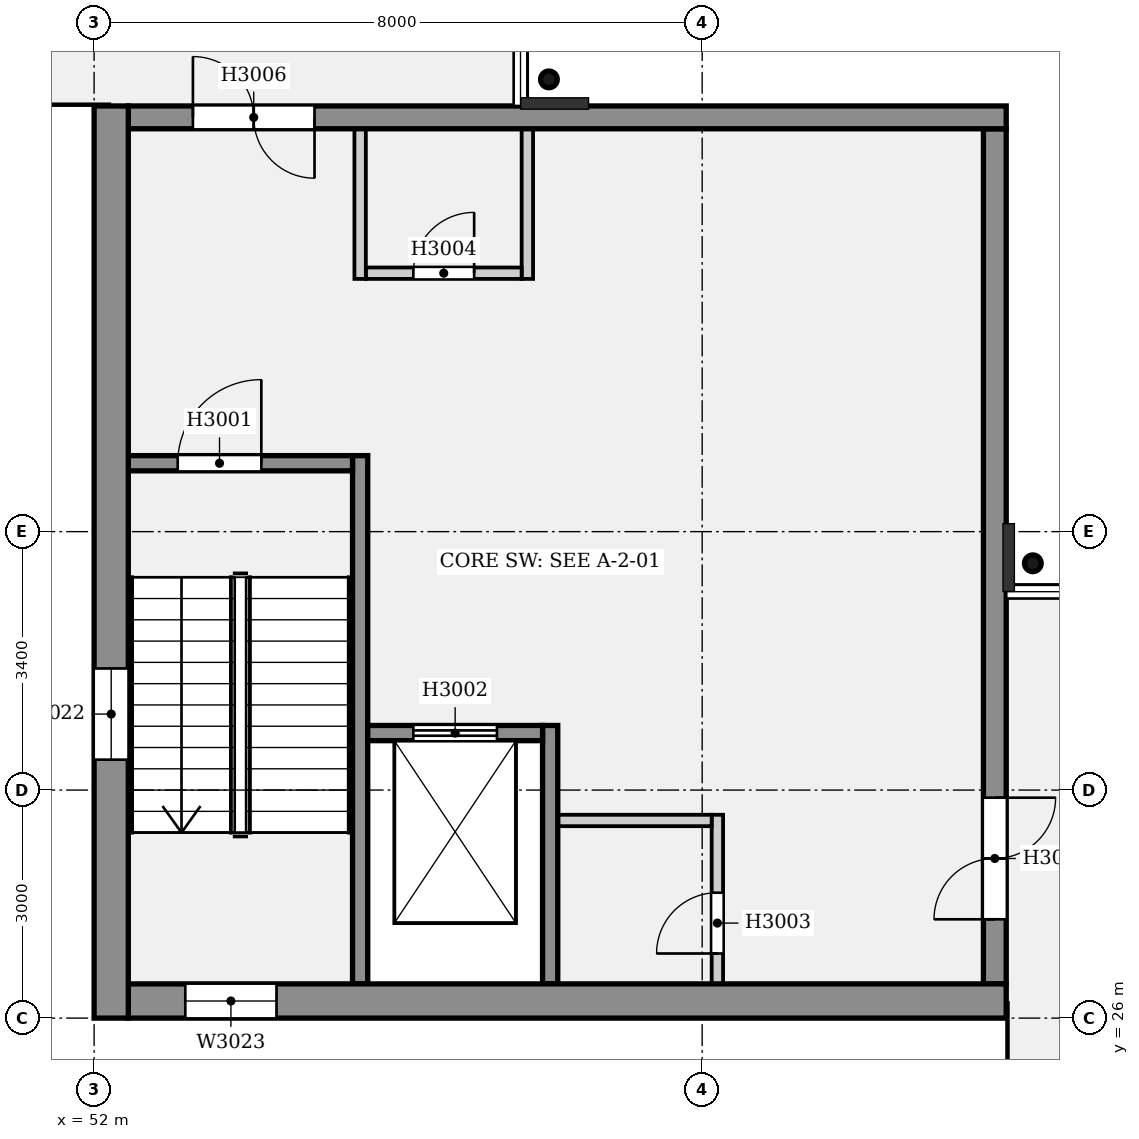
"""IFC4 building model, lengths in metres.
Left out: names, types, materials, properties, quantities, classifications, styles, units other than length and angle.
Written with IfcOpenShell. Run it as: python <this file> out.ifc"""

import sys

from ifc_helpers import new_model, si_unit, direction, frame, frame_2d, origin, origin_2d, place, context, subcontext, project, spatial, rectangle, hollow_circle, extrude, element, fill, save


model = new_model("IFC4")
c1 = context("Model", 3, precision=1e-05, world=origin(), true_north=direction((0.0, 1.0)))
c2 = subcontext(c1, "Body", "Model", "MODEL_VIEW")
j1 = project(units=[si_unit("LENGTHUNIT", "METRE"), si_unit("PLANEANGLEUNIT", "RADIAN")], contexts=[c1])
p1 = place(None, origin())
s1 = spatial("IfcSite", under=j1, at=p1, CompositionType="ELEMENT")
p2 = place(p1, origin())
s2 = spatial("IfcBuilding", under=s1, at=p2, CompositionType="ELEMENT")
p3 = place(p2, frame((0.0, 0.0, 13.8)))
s3 = spatial("IfcBuildingStorey", under=s2, at=p3, CompositionType="ELEMENT", Elevation=13.8)
p4 = place(p3, frame((52.225, 26.0, 0.0), z_axis=(0.0, 0.0, 1.0), x_axis=(0.0, 1.0, 0.0)))
e1 = element("IfcWall", 1, at=p4, inside=s3, PredefinedType="ELEMENTEDWALL", context=c2, shape_type="SweptSolid", body=[
    extrude(rectangle(XDim=12.0, YDim=0.45, at=frame_2d((6.0, 0.0))), origin(), (0.0, 0.0, 1.0), 4.4),
])
p5 = place(p4, frame((3.4, 0.0, 0.6)))
e2 = element("IfcOpeningElement", 2, at=p5, cuts=e1, PredefinedType="OPENING", context=c2, shape_type="SweptSolid", body=[
    extrude(rectangle(XDim=1.2, YDim=3.0, at=frame_2d((0.6, 1.5))), frame((0.0, 0.235, 0.0), z_axis=(0.0, -1.0, 0.0), x_axis=(1.0, 0.0, 0.0)), (0.0, 0.0, 1.0), 0.47),
])
p6 = place(p3, frame((52.45, 26.225, 0.0), z_axis=(0.0, 0.0, 1.0), x_axis=(1.0, 0.0, 0.0)))
e3 = element("IfcWall", 3, at=p6, inside=s3, PredefinedType="ELEMENTEDWALL", context=c2, shape_type="SweptSolid", body=[
    extrude(rectangle(XDim=11.55, YDim=0.45, at=frame_2d((5.775, 0.0))), origin(), (0.0, 0.0, 1.0), 4.4),
])
p7 = place(p6, frame((0.75, 0.0, 0.6)))
e4 = element("IfcOpeningElement", 4, at=p7, cuts=e3, PredefinedType="OPENING", context=c2, shape_type="SweptSolid", body=[
    extrude(rectangle(XDim=1.2, YDim=3.0, at=frame_2d((0.6, 1.5))), frame((0.0, 0.235, 0.0), z_axis=(0.0, -1.0, 0.0), x_axis=(1.0, 0.0, 0.0)), (0.0, 0.0, 1.0), 0.47),
])
p8 = place(p3, frame((63.85, 26.45, 0.0), z_axis=(0.0, 0.0, 1.0), x_axis=(0.0, 1.0, 0.0)))
e5 = element("IfcWall", 5, at=p8, inside=s3, PredefinedType="SOLIDWALL", context=c2, shape_type="SweptSolid", body=[
    extrude(rectangle(XDim=11.25, YDim=0.3, at=frame_2d((5.625, 0.0))), origin(), (0.0, 0.0, 1.0), 4.4),
])
p9 = place(p8, frame((0.85, 0.0, 0.0)))
e6 = element("IfcOpeningElement", 6, at=p9, cuts=e5, PredefinedType="OPENING", context=c2, shape_type="SweptSolid", body=[
    extrude(rectangle(XDim=1.6, YDim=2.1, at=frame_2d((0.8, 1.05))), frame((0.0, 0.16, 0.0), z_axis=(0.0, -1.0, 0.0), x_axis=(1.0, 0.0, 0.0)), (0.0, 0.0, 1.0), 0.32),
])
p10 = place(p3, frame((52.45, 37.85, 0.0), z_axis=(0.0, 0.0, 1.0), x_axis=(1.0, 0.0, 0.0)))
e7 = element("IfcWall", 7, at=p10, inside=s3, PredefinedType="SOLIDWALL", context=c2, shape_type="SweptSolid", body=[
    extrude(rectangle(XDim=11.55, YDim=0.3, at=frame_2d((5.775, 0.0))), origin(), (0.0, 0.0, 1.0), 4.4),
])
p11 = place(p10, frame((0.85, 0.0, 0.0)))
e8 = element("IfcOpeningElement", 8, at=p11, cuts=e7, PredefinedType="OPENING", context=c2, shape_type="SweptSolid", body=[
    extrude(rectangle(XDim=1.6, YDim=2.1, at=frame_2d((0.8, 1.05))), frame((0.0, 0.16, 0.0), z_axis=(0.0, -1.0, 0.0), x_axis=(1.0, 0.0, 0.0)), (0.0, 0.0, 1.0), 0.32),
])
for number, where, z_axis, x_axis in (
    (9, (64.35, 31.984, -0.128), (0.0, 0.199, 0.98), (-1.0, 0.0, 0.0)),
    (10, (57.984, 38.35, -0.128), (0.199, 0.0, 0.98), (0.0, 1.0, 0.0)),
):
    element("IfcColumn", number, at=place(p3, frame(where, z_axis=z_axis, x_axis=x_axis)), inside=s3, PredefinedType="COLUMN", context=c2, shape_type="SweptSolid", body=[
        extrude(hollow_circle(Radius=0.11, WallThickness=0.013, at=origin_2d()), origin(), (0.0, 0.0, 1.0), 4.621),
    ])
p12 = place(p3, frame((55.5, 26.45, 0.0), z_axis=(0.0, 0.0, 1.0), x_axis=(0.0, 1.0, 0.0)))
e11 = element("IfcWall", 11, at=p12, inside=s3, PredefinedType="SOLIDWALL", context=c2, shape_type="SweptSolid", body=[
    extrude(rectangle(XDim=6.95, YDim=0.2, at=frame_2d((3.475, 0.0))), origin(), (0.0, 0.0, 1.0), 4.4),
])
p13 = place(p3, frame((52.45, 33.3, 0.0), z_axis=(0.0, 0.0, 1.0), x_axis=(1.0, 0.0, 0.0)))
e12 = element("IfcWall", 12, at=p13, inside=s3, PredefinedType="SOLIDWALL", context=c2, shape_type="SweptSolid", body=[
    extrude(rectangle(XDim=2.95, YDim=0.2, at=frame_2d((1.475, 0.0))), origin(), (0.0, 0.0, 1.0), 4.4),
])
p14 = place(p13, frame((0.65, 0.0, 0.0)))
e13 = element("IfcOpeningElement", 13, at=p14, cuts=e12, PredefinedType="OPENING", context=c2, shape_type="SweptSolid", body=[
    extrude(rectangle(XDim=1.1, YDim=2.1, at=frame_2d((0.55, 1.05))), frame((0.0, 0.11, 0.0), z_axis=(0.0, -1.0, 0.0), x_axis=(1.0, 0.0, 0.0)), (0.0, 0.0, 1.0), 0.22),
])
p15 = place(p3, frame((58.0, 26.45, 0.0), z_axis=(0.0, 0.0, 1.0), x_axis=(0.0, 1.0, 0.0)))
e14 = element("IfcWall", 14, at=p15, inside=s3, PredefinedType="SOLIDWALL", context=c2, shape_type="SweptSolid", body=[
    extrude(rectangle(XDim=3.4, YDim=0.2, at=frame_2d((1.7, 0.0))), origin(), (0.0, 0.0, 1.0), 4.4),
])
p16 = place(p3, frame((55.6, 29.75, 0.0), z_axis=(0.0, 0.0, 1.0), x_axis=(1.0, 0.0, 0.0)))
e15 = element("IfcWall", 15, at=p16, inside=s3, PredefinedType="SOLIDWALL", context=c2, shape_type="SweptSolid", body=[
    extrude(rectangle(XDim=2.3, YDim=0.2, at=frame_2d((1.15, 0.0))), origin(), (0.0, 0.0, 1.0), 4.4),
])
p17 = place(p16, frame((0.6, 0.0, 0.0)))
e16 = element("IfcOpeningElement", 16, at=p17, cuts=e15, PredefinedType="OPENING", context=c2, shape_type="SweptSolid", body=[
    extrude(rectangle(XDim=1.1, YDim=2.1, at=frame_2d((0.55, 1.05))), frame((0.0, 0.11, 0.0), z_axis=(0.0, -1.0, 0.0), x_axis=(1.0, 0.0, 0.0)), (0.0, 0.0, 1.0), 0.22),
])
p18 = place(p3, frame((58.1, 28.6, 0.0), z_axis=(0.0, 0.0, 1.0), x_axis=(1.0, 0.0, 0.0)))
e17 = element("IfcWall", 17, at=p18, inside=s3, PredefinedType="PARTITIONING", context=c2, shape_type="SweptSolid", body=[
    extrude(rectangle(XDim=2.025, YDim=0.15, at=frame_2d((1.012, 0.0))), origin(), (0.0, 0.0, 1.0), 4.15),
])
p19 = place(p3, frame((60.2, 26.45, 0.0), z_axis=(0.0, 0.0, 1.0), x_axis=(0.0, 1.0, 0.0)))
e18 = element("IfcWall", 18, at=p19, inside=s3, PredefinedType="PARTITIONING", context=c2, shape_type="SweptSolid", body=[
    extrude(rectangle(XDim=2.225, YDim=0.15, at=frame_2d((1.113, 0.0))), origin(), (0.0, 0.0, 1.0), 4.15),
])
p20 = place(p19, frame((0.4, 0.0, 0.0)))
e19 = element("IfcOpeningElement", 19, at=p20, cuts=e18, PredefinedType="OPENING", context=c2, shape_type="SweptSolid", body=[
    extrude(rectangle(XDim=0.8, YDim=2.1, at=frame_2d((0.4, 1.05))), frame((0.0, 0.085, 0.0), z_axis=(0.0, -1.0, 0.0), x_axis=(1.0, 0.0, 0.0)), (0.0, 0.0, 1.0), 0.17),
])
p21 = place(p3, frame((55.575, 35.8, 0.0), z_axis=(0.0, 0.0, 1.0), x_axis=(1.0, 0.0, 0.0)))
e20 = element("IfcWall", 20, at=p21, inside=s3, PredefinedType="PARTITIONING", context=c2, shape_type="SweptSolid", body=[
    extrude(rectangle(XDim=2.05, YDim=0.15, at=frame_2d((1.025, 0.0))), origin(), (0.0, 0.0, 1.0), 4.15),
])
p22 = place(p21, frame((0.625, 0.0, 0.0)))
e21 = element("IfcOpeningElement", 21, at=p22, cuts=e20, PredefinedType="OPENING", context=c2, shape_type="SweptSolid", body=[
    extrude(rectangle(XDim=0.8, YDim=2.1, at=frame_2d((0.4, 1.05))), frame((0.0, 0.085, 0.0), z_axis=(0.0, -1.0, 0.0), x_axis=(1.0, 0.0, 0.0)), (0.0, 0.0, 1.0), 0.17),
])
for number, where, z_axis, x_axis in (
    (22, (55.5, 35.725, 0.0), (0.0, 0.0, 1.0), (0.0, 1.0, 0.0)),
    (23, (57.7, 35.725, 0.0), (0.0, 0.0, 1.0), (0.0, 1.0, 0.0)),
):
    element("IfcWall", number, at=place(p3, frame(where, z_axis=z_axis, x_axis=x_axis)), inside=s3, PredefinedType="PARTITIONING", context=c2, shape_type="SweptSolid", body=[
        extrude(rectangle(XDim=1.975, YDim=0.15, at=frame_2d((0.987, 0.0))), origin(), (0.0, 0.0, 1.0), 4.15),
    ])
p23 = place(p14, origin())
e24 = element("IfcDoor", 24, at=p23, inside=s3, OperationType="SINGLE_SWING_RIGHT", PredefinedType="DOOR", context=c2, shape_type="SweptSolid", body=[
    extrude(rectangle(XDim=1.1, YDim=2.1, at=frame_2d((0.55, 1.05))), frame((0.0, 0.025, 0.0), z_axis=(0.0, -1.0, 0.0), x_axis=(1.0, 0.0, 0.0)), (0.0, 0.0, 1.0), 0.05),
])
fill(e13, e24)
p24 = place(p17, origin())
e25 = element("IfcDoor", 25, at=p24, inside=s3, OperationType="DOUBLE_DOOR_SLIDING", PredefinedType="DOOR", context=c2, shape_type="SweptSolid", body=[
    extrude(rectangle(XDim=1.1, YDim=2.1, at=frame_2d((0.55, 1.05))), frame((0.0, 0.025, 0.0), z_axis=(0.0, -1.0, 0.0), x_axis=(1.0, 0.0, 0.0)), (0.0, 0.0, 1.0), 0.05),
])
fill(e16, e25)
p25 = place(p20, origin())
e26 = element("IfcDoor", 26, at=p25, inside=s3, OperationType="SINGLE_SWING_LEFT", PredefinedType="DOOR", context=c2, shape_type="SweptSolid", body=[
    extrude(rectangle(XDim=0.8, YDim=2.1, at=frame_2d((0.4, 1.05))), frame((0.0, 0.025, 0.0), z_axis=(0.0, -1.0, 0.0), x_axis=(1.0, 0.0, 0.0)), (0.0, 0.0, 1.0), 0.05),
])
fill(e19, e26)
p26 = place(p22, origin())
e27 = element("IfcDoor", 27, at=p26, inside=s3, OperationType="SINGLE_SWING_RIGHT", PredefinedType="DOOR", context=c2, shape_type="SweptSolid", body=[
    extrude(rectangle(XDim=0.8, YDim=2.1, at=frame_2d((0.4, 1.05))), frame((0.0, 0.025, 0.0), z_axis=(0.0, -1.0, 0.0), x_axis=(1.0, 0.0, 0.0)), (0.0, 0.0, 1.0), 0.05),
])
fill(e21, e27)
p27 = place(p9, origin())
e28 = element("IfcDoor", 28, at=p27, inside=s3, OperationType="DOUBLE_DOOR_SINGLE_SWING", PredefinedType="DOOR", context=c2, shape_type="SweptSolid", body=[
    extrude(rectangle(XDim=1.6, YDim=2.1, at=frame_2d((0.8, 1.05))), frame((0.0, 0.025, 0.0), z_axis=(0.0, -1.0, 0.0), x_axis=(1.0, 0.0, 0.0)), (0.0, 0.0, 1.0), 0.05),
])
fill(e6, e28)
p28 = place(p11, origin())
e29 = element("IfcDoor", 29, at=p28, inside=s3, OperationType="DOUBLE_DOOR_SINGLE_SWING", PredefinedType="DOOR", context=c2, shape_type="SweptSolid", body=[
    extrude(rectangle(XDim=1.6, YDim=2.1, at=frame_2d((0.8, 1.05))), frame((0.0, 0.025, 0.0), z_axis=(0.0, -1.0, 0.0), x_axis=(1.0, 0.0, 0.0)), (0.0, 0.0, 1.0), 0.05),
])
fill(e8, e29)
p29 = place(p5, origin())
e30 = element("IfcWindow", 30, at=p29, inside=s3, PartitioningType="SINGLE_PANEL", PredefinedType="WINDOW", context=c2, shape_type="SweptSolid", body=[
    extrude(rectangle(XDim=1.2, YDim=3.0, at=frame_2d((0.6, 1.5))), frame((0.0, 0.03, 0.0), z_axis=(0.0, -1.0, 0.0), x_axis=(1.0, 0.0, 0.0)), (0.0, 0.0, 1.0), 0.06),
])
fill(e2, e30)
p30 = place(p7, origin())
e31 = element("IfcWindow", 31, at=p30, inside=s3, PartitioningType="SINGLE_PANEL", PredefinedType="WINDOW", context=c2, shape_type="SweptSolid", body=[
    extrude(rectangle(XDim=1.2, YDim=3.0, at=frame_2d((0.6, 1.5))), frame((0.0, 0.03, 0.0), z_axis=(0.0, -1.0, 0.0), x_axis=(1.0, 0.0, 0.0)), (0.0, 0.0, 1.0), 0.06),
])
fill(e4, e31)
save(model, sys.argv[1])
